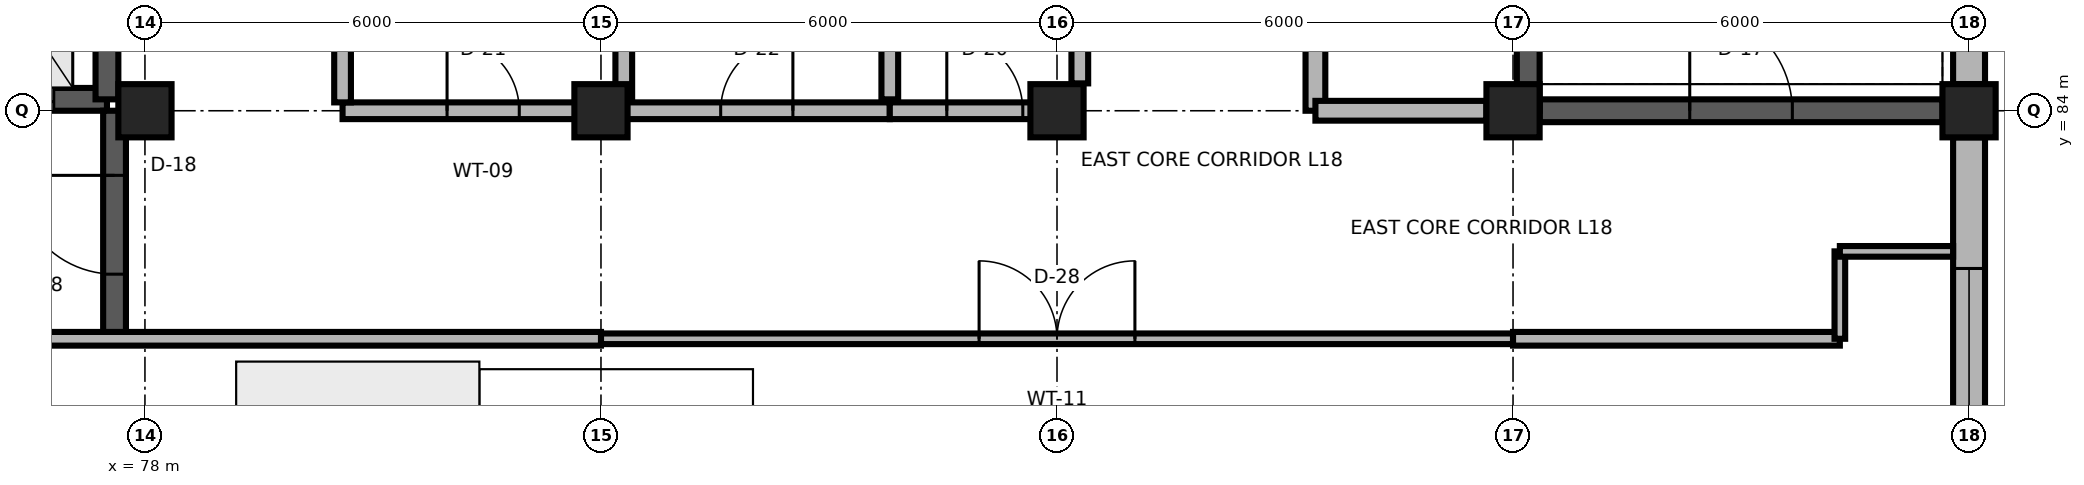
"""IFC4 building model, lengths in metres.
Left out: names, types, materials, properties, quantities, classifications, styles, units other than length and angle.
Written with IfcOpenShell. Run it as: python <this file> out.ifc"""

import sys

from ifc_helpers import new_model, si_unit, direction, frame, frame_2d, origin, origin_2d, place, context, subcontext, project, spatial, rectangle, extrude, element, fill, save


model = new_model("IFC4")
c1 = context("Model", 3, precision=1e-05, world=origin(), true_north=direction((0.0, 1.0)))
c2 = subcontext(c1, "Body", "Model", "MODEL_VIEW")
j1 = project(units=[si_unit("LENGTHUNIT", "METRE"), si_unit("PLANEANGLEUNIT", "RADIAN")], contexts=[c1])
p1 = place(None, origin())
s1 = spatial("IfcSite", under=j1, at=p1, CompositionType="ELEMENT")
p2 = place(p1, origin())
s2 = spatial("IfcBuilding", under=s1, at=p2, CompositionType="ELEMENT")
p3 = place(p2, frame((0.0, 0.0, 72.0)))
s3 = spatial("IfcBuildingStorey", under=s2, at=p3, CompositionType="ELEMENT", Elevation=72.0)
for number, where, z_axis, x_axis in (
    (1, (78.0, 84.0, 0.0), (0.0, 0.0, 1.0), (1.0, 0.0, 0.0)),
    (2, (84.0, 84.0, 0.0), (0.0, 0.0, 1.0), (1.0, 0.0, 0.0)),
    (3, (90.0, 84.0, 0.0), (0.0, 0.0, 1.0), (1.0, 0.0, 0.0)),
    (4, (96.0, 84.0, 0.0), (0.0, 0.0, 1.0), (1.0, 0.0, 0.0)),
    (5, (102.0, 84.0, 0.0), (0.0, 0.0, 1.0), (1.0, 0.0, 0.0)),
):
    element("IfcColumn", number, at=place(p3, frame(where, z_axis=z_axis, x_axis=x_axis)), inside=s3, PredefinedType="COLUMN", context=c2, shape_type="SweptSolid", body=[
        extrude(rectangle(XDim=0.7, YDim=0.7, at=origin_2d()), origin(), (0.0, 0.0, 1.0), 4.3),
    ])
p4 = place(p3, frame((102.0, 78.35, 0.0), z_axis=(0.0, 0.0, 1.0), x_axis=(0.0, 1.0, 0.0)))
e6 = element("IfcWall", 6, at=p4, inside=s3, PredefinedType="SOLIDWALL", context=c2, shape_type="SweptSolid", body=[
    extrude(rectangle(XDim=5.3, YDim=0.42, at=frame_2d((2.65, 0.0))), origin(), (0.0, 0.0, 1.0), 3.88),
])
p5 = place(p4, frame((1.725, 0.0, 0.85)))
e7 = element("IfcOpeningElement", 7, at=p5, cuts=e6, PredefinedType="OPENING", context=c2, shape_type="SweptSolid", body=[
    extrude(rectangle(XDim=1.85, YDim=2.55, at=frame_2d((0.925, 1.275))), frame((0.0, 0.225, 0.0), z_axis=(0.0, -1.0, 0.0), x_axis=(1.0, 0.0, 0.0)), (0.0, 0.0, 1.0), 0.45),
])
p6 = place(p3, frame((102.0, 84.35, 0.0), z_axis=(0.0, 0.0, 1.0), x_axis=(0.0, 1.0, 0.0)))
e8 = element("IfcWall", 8, at=p6, inside=s3, PredefinedType="SOLIDWALL", context=c2, shape_type="SweptSolid", body=[
    extrude(rectangle(XDim=5.3, YDim=0.42, at=frame_2d((2.65, 0.0))), origin(), (0.0, 0.0, 1.0), 3.88),
])
p7 = place(p3, frame((96.35, 84.0, 0.0), z_axis=(0.0, 0.0, 1.0), x_axis=(1.0, 0.0, 0.0)))
e9 = element("IfcWall", 9, at=p7, inside=s3, PredefinedType="SHEAR", context=c2, shape_type="SweptSolid", body=[
    extrude(rectangle(XDim=5.3, YDim=0.3, at=frame_2d((2.65, 0.0))), origin(), (0.0, 0.0, 1.0), 4.3),
])
p8 = place(p7, frame((1.975, 0.0, 0.0)))
e10 = element("IfcOpeningElement", 10, at=p8, cuts=e9, PredefinedType="OPENING", context=c2, shape_type="SweptSolid", body=[
    extrude(rectangle(XDim=1.35, YDim=2.2, at=frame_2d((0.675, 1.1))), frame((0.0, 0.165, 0.0), z_axis=(0.0, -1.0, 0.0), x_axis=(1.0, 0.0, 0.0)), (0.0, 0.0, 1.0), 0.33),
])
p9 = place(p3, frame((96.2, 84.0, 0.0), z_axis=(0.0, 0.0, 1.0), x_axis=(0.0, 1.0, 0.0)))
e11 = element("IfcWall", 11, at=p9, inside=s3, PredefinedType="SHEAR", context=c2, shape_type="SweptSolid", body=[
    extrude(rectangle(XDim=11.8, YDim=0.3, at=frame_2d((5.9, 0.0))), origin(), (0.0, 0.0, 1.0), 4.3),
])
p10 = place(p3, frame((75.0, 84.15, 0.0), z_axis=(0.0, 0.0, 1.0), x_axis=(1.0, 0.0, 0.0)))
e12 = element("IfcWall", 12, at=p10, inside=s3, PredefinedType="SHEAR", context=c2, shape_type="SweptSolid", body=[
    extrude(rectangle(XDim=2.5, YDim=0.3, at=frame_2d((1.25, 0.0))), origin(), (0.0, 0.0, 1.0), 4.3),
])
p11 = place(p10, frame((0.7, 0.0, 0.0)))
e13 = element("IfcOpeningElement", 13, at=p11, cuts=e12, PredefinedType="OPENING", context=c2, shape_type="SweptSolid", body=[
    extrude(rectangle(XDim=1.1, YDim=2.1, at=frame_2d((0.55, 1.05))), frame((0.0, 0.165, 0.0), z_axis=(0.0, -1.0, 0.0), x_axis=(1.0, 0.0, 0.0)), (0.0, 0.0, 1.0), 0.33),
])
p12 = place(p3, frame((77.5, 84.15, 0.0), z_axis=(0.0, 0.0, 1.0), x_axis=(0.0, 1.0, 0.0)))
e14 = element("IfcWall", 14, at=p12, inside=s3, PredefinedType="SHEAR", context=c2, shape_type="SweptSolid", body=[
    extrude(rectangle(XDim=3.4, YDim=0.3, at=frame_2d((1.7, 0.0))), origin(), (0.0, 0.0, 1.0), 4.3),
])
p13 = place(p3, frame((93.4, 84.0, 0.0), z_axis=(0.0, 0.0, 1.0), x_axis=(0.0, 1.0, 0.0)))
e15 = element("IfcWall", 15, at=p13, inside=s3, PredefinedType="PARTITIONING", context=c2, shape_type="SweptSolid", body=[
    extrude(rectangle(XDim=11.96, YDim=0.26, at=frame_2d((5.98, 0.0))), origin(), (0.0, 0.0, 1.0), 4.3),
])
p14 = place(p13, frame((3.425, 0.0, 0.0)))
e16 = element("IfcOpeningElement", 16, at=p14, cuts=e15, PredefinedType="OPENING", context=c2, shape_type="SweptSolid", body=[
    extrude(rectangle(XDim=1.15, YDim=2.2, at=frame_2d((0.575, 1.1))), frame((0.0, 0.145, 0.0), z_axis=(0.0, -1.0, 0.0), x_axis=(1.0, 0.0, 0.0)), (0.0, 0.0, 1.0), 0.29),
])
p15 = place(p3, frame((93.4, 84.0, 0.0), z_axis=(0.0, 0.0, 1.0), x_axis=(1.0, 0.0, 0.0)))
e17 = element("IfcWall", 17, at=p15, inside=s3, PredefinedType="PARTITIONING", context=c2, shape_type="SweptSolid", body=[
    extrude(rectangle(XDim=2.25, YDim=0.26, at=frame_2d((1.125, 0.0))), origin(), (0.0, 0.0, 1.0), 4.056),
])
p16 = place(p3, frame((77.6, 81.0, 0.0), z_axis=(0.0, 0.0, 1.0), x_axis=(0.0, 1.0, 0.0)))
e18 = element("IfcWall", 18, at=p16, inside=s3, PredefinedType="SHEAR", context=c2, shape_type="SweptSolid", body=[
    extrude(rectangle(XDim=3.0, YDim=0.3, at=frame_2d((1.5, 0.0))), origin(), (0.0, 0.0, 1.0), 4.3),
])
p17 = place(p16, frame((0.85, 0.0, 0.0)))
e19 = element("IfcOpeningElement", 19, at=p17, cuts=e18, PredefinedType="OPENING", context=c2, shape_type="SweptSolid", body=[
    extrude(rectangle(XDim=1.3, YDim=2.2, at=frame_2d((0.65, 1.1))), frame((0.0, 0.165, 0.0), z_axis=(0.0, -1.0, 0.0), x_axis=(1.0, 0.0, 0.0)), (0.0, 0.0, 1.0), 0.33),
])
p18 = place(p3, frame((80.6, 84.0, 0.0), z_axis=(0.0, 0.0, 1.0), x_axis=(1.0, 0.0, 0.0)))
e20 = element("IfcWall", 20, at=p18, inside=s3, PredefinedType="PARTITIONING", context=c2, shape_type="SweptSolid", body=[
    extrude(rectangle(XDim=3.7, YDim=0.22, at=frame_2d((1.85, 0.0))), origin(), (0.0, 0.0, 1.0), 4.056),
])
p19 = place(p18, frame((1.375, 0.0, 0.0)))
e21 = element("IfcOpeningElement", 21, at=p19, cuts=e20, PredefinedType="OPENING", context=c2, shape_type="SweptSolid", body=[
    extrude(rectangle(XDim=0.95, YDim=2.15, at=frame_2d((0.475, 1.075))), frame((0.0, 0.125, 0.0), z_axis=(0.0, -1.0, 0.0), x_axis=(1.0, 0.0, 0.0)), (0.0, 0.0, 1.0), 0.25),
])
p20 = place(p3, frame((84.3, 84.0, 0.0), z_axis=(0.0, 0.0, 1.0), x_axis=(1.0, 0.0, 0.0)))
e22 = element("IfcWall", 22, at=p20, inside=s3, PredefinedType="PARTITIONING", context=c2, shape_type="SweptSolid", body=[
    extrude(rectangle(XDim=3.5, YDim=0.22, at=frame_2d((1.75, 0.0))), origin(), (0.0, 0.0, 1.0), 4.056),
])
p21 = place(p20, frame((1.275, 0.0, 0.0)))
e23 = element("IfcOpeningElement", 23, at=p21, cuts=e22, PredefinedType="OPENING", context=c2, shape_type="SweptSolid", body=[
    extrude(rectangle(XDim=0.95, YDim=2.1, at=frame_2d((0.475, 1.05))), frame((0.0, 0.125, 0.0), z_axis=(0.0, -1.0, 0.0), x_axis=(1.0, 0.0, 0.0)), (0.0, 0.0, 1.0), 0.25),
])
p22 = place(p3, frame((87.8, 84.0, 0.0), z_axis=(0.0, 0.0, 1.0), x_axis=(1.0, 0.0, 0.0)))
e24 = element("IfcWall", 24, at=p22, inside=s3, PredefinedType="PARTITIONING", context=c2, shape_type="SweptSolid", body=[
    extrude(rectangle(XDim=2.5, YDim=0.22, at=frame_2d((1.25, 0.0))), origin(), (0.0, 0.0, 1.0), 4.056),
])
p23 = place(p22, frame((0.75, 0.0, 0.0)))
e25 = element("IfcOpeningElement", 25, at=p23, cuts=e24, PredefinedType="OPENING", context=c2, shape_type="SweptSolid", body=[
    extrude(rectangle(XDim=1.0, YDim=2.15, at=frame_2d((0.5, 1.075))), frame((0.0, 0.125, 0.0), z_axis=(0.0, -1.0, 0.0), x_axis=(1.0, 0.0, 0.0)), (0.0, 0.0, 1.0), 0.25),
])
for number, where, z_axis, x_axis in (
    (26, (84.3, 84.15, 0.0), (0.0, 0.0, 1.0), (0.0, 1.0, 0.0)),
    (27, (87.8, 84.15, 0.0), (0.0, 0.0, 1.0), (0.0, 1.0, 0.0)),
):
    element("IfcWall", number, at=place(p3, frame(where, z_axis=z_axis, x_axis=x_axis)), inside=s3, PredefinedType="PARTITIONING", context=c2, shape_type="SweptSolid", body=[
        extrude(rectangle(XDim=5.0, YDim=0.22, at=frame_2d((2.5, 0.0))), origin(), (0.0, 0.0, 1.0), 4.3),
    ])
p24 = place(p3, frame((84.0, 81.0, 0.0), z_axis=(0.0, 0.0, 1.0), x_axis=(1.0, 0.0, 0.0)))
e28 = element("IfcWall", 28, at=p24, inside=s3, PredefinedType="PARTITIONING", context=c2, shape_type="SweptSolid", body=[
    extrude(rectangle(XDim=12.0, YDim=0.14, at=frame_2d((6.0, 0.0))), origin(), (0.0, 0.0, 1.0), 4.3),
])
p25 = place(p24, frame((4.975, 0.0, 0.0)))
e29 = element("IfcOpeningElement", 29, at=p25, cuts=e28, PredefinedType="OPENING", context=c2, shape_type="SweptSolid", body=[
    extrude(rectangle(XDim=2.05, YDim=2.85, at=frame_2d((1.025, 1.425))), frame((0.0, 0.085, 0.0), z_axis=(0.0, -1.0, 0.0), x_axis=(1.0, 0.0, 0.0)), (0.0, 0.0, 1.0), 0.17),
])
p26 = place(p3, frame((80.6, 84.11, 0.0), z_axis=(0.0, 0.0, 1.0), x_axis=(0.0, 1.0, 0.0)))
e30 = element("IfcWall", 30, at=p26, inside=s3, PredefinedType="PARTITIONING", context=c2, shape_type="SweptSolid", body=[
    extrude(rectangle(XDim=4.98, YDim=0.22, at=frame_2d((2.49, 0.0))), origin(), (0.0, 0.0, 1.0), 4.3),
])
p27 = place(p3, frame((90.3, 84.36, 0.0), z_axis=(0.0, 0.0, 1.0), x_axis=(0.0, 1.0, 0.0)))
e31 = element("IfcWall", 31, at=p27, inside=s3, PredefinedType="PARTITIONING", context=c2, shape_type="SweptSolid", body=[
    extrude(rectangle(XDim=4.73, YDim=0.22, at=frame_2d((2.365, 0.0))), origin(), (0.0, 0.0, 1.0), 4.3),
])
p28 = place(p3, frame((67.7, 81.0, 0.0), z_axis=(0.0, 0.0, 1.0), x_axis=(1.0, 0.0, 0.0)))
e32 = element("IfcWall", 32, at=p28, inside=s3, PredefinedType="PARTITIONING", context=c2, shape_type="SweptSolid", body=[
    extrude(rectangle(XDim=16.3, YDim=0.18, at=frame_2d((8.15, 0.0))), origin(), (0.0, 0.0, 1.0), 4.3),
])
p29 = place(p3, frame((96.0, 81.0, 0.0), z_axis=(0.0, 0.0, 1.0), x_axis=(1.0, 0.0, 0.0)))
e33 = element("IfcWall", 33, at=p29, inside=s3, PredefinedType="PARTITIONING", context=c2, shape_type="SweptSolid", body=[
    extrude(rectangle(XDim=4.3, YDim=0.18, at=frame_2d((2.15, 0.0))), origin(), (0.0, 0.0, 1.0), 4.3),
])
p30 = place(p3, frame((100.3, 81.0, 0.0), z_axis=(0.0, 0.0, 1.0), x_axis=(0.0, 1.0, 0.0)))
e34 = element("IfcWall", 34, at=p30, inside=s3, PredefinedType="PARTITIONING", context=c2, shape_type="SweptSolid", body=[
    extrude(rectangle(XDim=1.15, YDim=0.14, at=frame_2d((0.575, 0.0))), origin(), (0.0, 0.0, 1.0), 4.3),
])
p31 = place(p3, frame((100.3, 82.15, 0.0), z_axis=(0.0, 0.0, 1.0), x_axis=(1.0, 0.0, 0.0)))
e35 = element("IfcWall", 35, at=p31, inside=s3, PredefinedType="PARTITIONING", context=c2, shape_type="SweptSolid", body=[
    extrude(rectangle(XDim=1.49, YDim=0.14, at=frame_2d((0.745, 0.0))), origin(), (0.0, 0.0, 1.0), 4.3),
])
p32 = place(p5, origin())
e36 = element("IfcWindow", 36, at=p32, inside=s3, PartitioningType="SINGLE_PANEL", PredefinedType="WINDOW", context=c2, shape_type="SweptSolid", body=[
    extrude(rectangle(XDim=1.85, YDim=2.55, at=frame_2d((0.925, 1.275))), frame((0.0, 0.03, 0.0), z_axis=(0.0, -1.0, 0.0), x_axis=(1.0, 0.0, 0.0)), (0.0, 0.0, 1.0), 0.06),
])
fill(e7, e36)
p33 = place(p8, origin())
e37 = element("IfcDoor", 37, at=p33, inside=s3, OperationType="SINGLE_SWING_LEFT", PredefinedType="DOOR", context=c2, shape_type="SweptSolid", body=[
    extrude(rectangle(XDim=1.35, YDim=2.2, at=frame_2d((0.675, 1.1))), frame((0.0, 0.025, 0.0), z_axis=(0.0, -1.0, 0.0), x_axis=(1.0, 0.0, 0.0)), (0.0, 0.0, 1.0), 0.05),
])
fill(e10, e37)
p34 = place(p11, origin())
e38 = element("IfcDoor", 38, at=p34, inside=s3, OperationType="DOUBLE_DOOR_SLIDING", PredefinedType="DOOR", context=c2, shape_type="SweptSolid", body=[
    extrude(rectangle(XDim=1.1, YDim=2.1, at=frame_2d((0.55, 1.05))), frame((0.0, 0.025, 0.0), z_axis=(0.0, -1.0, 0.0), x_axis=(1.0, 0.0, 0.0)), (0.0, 0.0, 1.0), 0.05),
])
fill(e13, e38)
p35 = place(p17, origin())
e39 = element("IfcDoor", 39, at=p35, inside=s3, OperationType="SINGLE_SWING_RIGHT", PredefinedType="DOOR", context=c2, shape_type="SweptSolid", body=[
    extrude(rectangle(XDim=1.3, YDim=2.2, at=frame_2d((0.65, 1.1))), frame((0.0, 0.025, 0.0), z_axis=(0.0, -1.0, 0.0), x_axis=(1.0, 0.0, 0.0)), (0.0, 0.0, 1.0), 0.05),
])
fill(e19, e39)
p36 = place(p19, origin())
e40 = element("IfcDoor", 40, at=p36, inside=s3, OperationType="SINGLE_SWING_LEFT", PredefinedType="DOOR", context=c2, shape_type="SweptSolid", body=[
    extrude(rectangle(XDim=0.95, YDim=2.15, at=frame_2d((0.475, 1.075))), frame((0.0, 0.025, 0.0), z_axis=(0.0, -1.0, 0.0), x_axis=(1.0, 0.0, 0.0)), (0.0, 0.0, 1.0), 0.05),
])
fill(e21, e40)
p37 = place(p21, origin())
e41 = element("IfcDoor", 41, at=p37, inside=s3, OperationType="SINGLE_SWING_RIGHT", PredefinedType="DOOR", context=c2, shape_type="SweptSolid", body=[
    extrude(rectangle(XDim=0.95, YDim=2.1, at=frame_2d((0.475, 1.05))), frame((0.0, 0.025, 0.0), z_axis=(0.0, -1.0, 0.0), x_axis=(1.0, 0.0, 0.0)), (0.0, 0.0, 1.0), 0.05),
])
fill(e23, e41)
p38 = place(p23, origin())
e42 = element("IfcDoor", 42, at=p38, inside=s3, OperationType="SINGLE_SWING_LEFT", PredefinedType="DOOR", context=c2, shape_type="SweptSolid", body=[
    extrude(rectangle(XDim=1.0, YDim=2.15, at=frame_2d((0.5, 1.075))), frame((0.0, 0.025, 0.0), z_axis=(0.0, -1.0, 0.0), x_axis=(1.0, 0.0, 0.0)), (0.0, 0.0, 1.0), 0.05),
])
fill(e25, e42)
p39 = place(p25, origin())
e43 = element("IfcDoor", 43, at=p39, inside=s3, OperationType="DOUBLE_DOOR_SINGLE_SWING", PredefinedType="DOOR", context=c2, shape_type="SweptSolid", body=[
    extrude(rectangle(XDim=2.05, YDim=2.85, at=frame_2d((1.025, 1.425))), frame((0.0, 0.025, 0.0), z_axis=(0.0, -1.0, 0.0), x_axis=(1.0, 0.0, 0.0)), (0.0, 0.0, 1.0), 0.05),
])
fill(e29, e43)
save(model, sys.argv[1])
